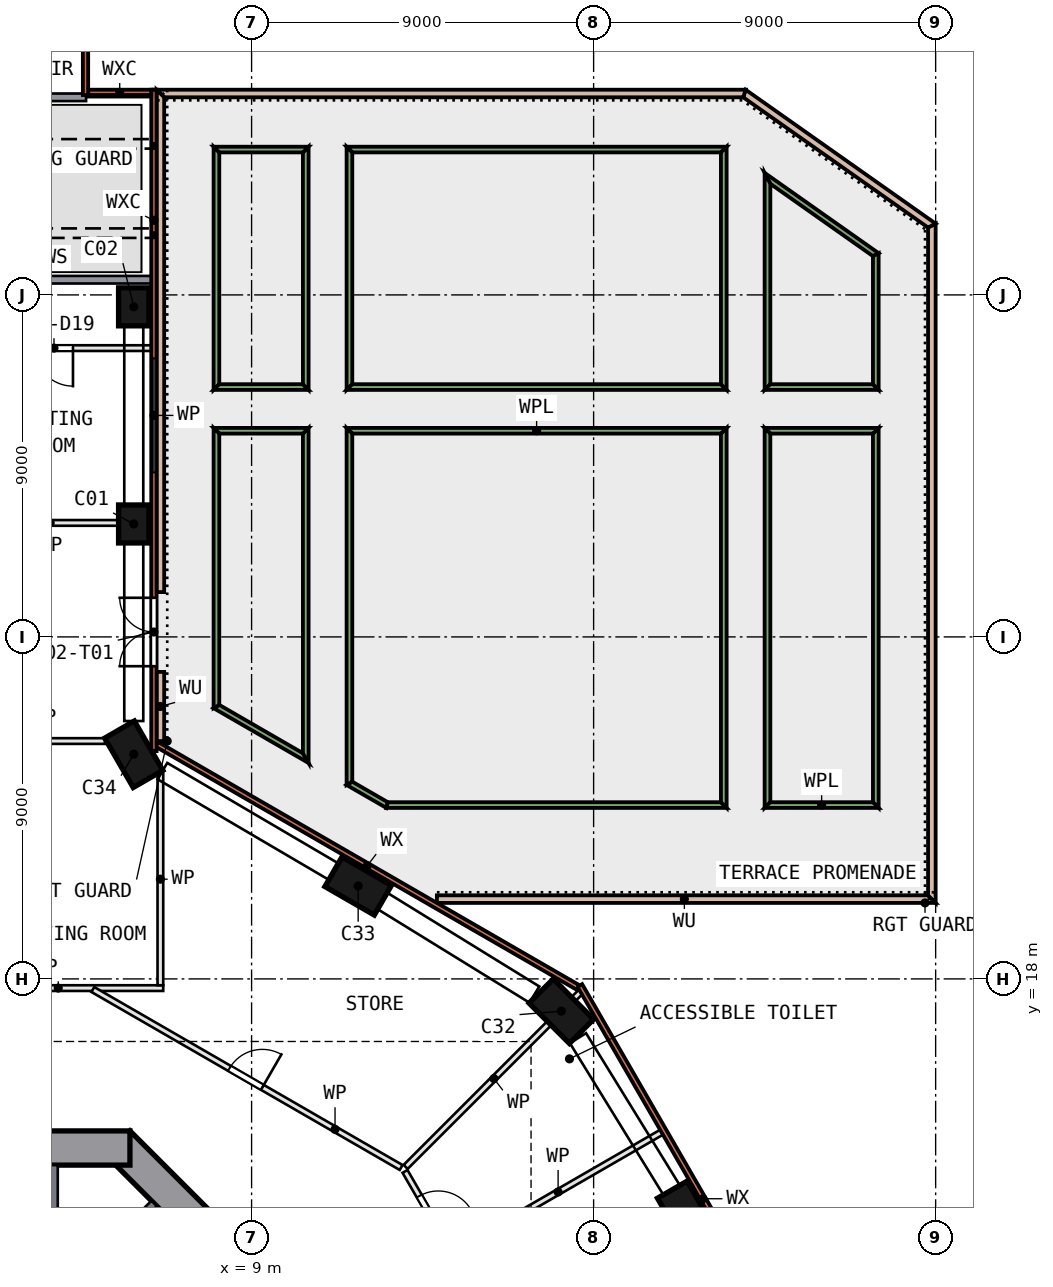
"""IFC4 building model, lengths in metres.
Left out: names, types, materials, properties, quantities, classifications, styles, units other than length and angle.
Written with IfcOpenShell. Run it as: python <this file> out.ifc"""

import sys

from ifc_helpers import new_model, si_unit, direction, frame, frame_2d, origin, origin_2d, place, context, subcontext, project, spatial, polyline, rectangle, outline, extrude, element, fill, save


model = new_model("IFC4")
c1 = context("Model", 3, precision=1e-05, world=origin(), true_north=direction((0.0, 1.0)))
c2 = subcontext(c1, "Body", "Model", "MODEL_VIEW")
j1 = project(units=[si_unit("LENGTHUNIT", "METRE"), si_unit("PLANEANGLEUNIT", "RADIAN")], contexts=[c1])
p1 = place(None, origin())
s1 = spatial("IfcSite", under=j1, at=p1, CompositionType="ELEMENT")
p2 = place(p1, origin())
s2 = spatial("IfcBuilding", under=s1, at=p2, CompositionType="ELEMENT")
p3 = place(p2, frame((0.0, 0.0, 14.0)))
s3 = spatial("IfcBuildingStorey", under=s2, at=p3, CompositionType="ELEMENT", Elevation=14.0)
for number, where, z_axis, x_axis in (
    (1, (5.9, 29.972, 0.0), (0.0, 0.0, 1.0), (0.0, 1.0, 0.0)),
    (2, (5.9, 35.686, 0.0), (0.0, 0.0, 1.0), (0.0, 1.0, 0.0)),
):
    element("IfcColumn", number, at=place(p3, frame(where, z_axis=z_axis, x_axis=x_axis)), inside=s3, PredefinedType="COLUMN", context=c2, shape_type="SweptSolid", body=[
        extrude(rectangle(XDim=1.0, YDim=0.8, at=origin_2d()), origin(), (0.0, 0.0, 1.0), 4.55),
    ])
for number, where, z_axis, x_axis in (
    (3, (20.445, 11.804, 0.0), (0.0, 0.0, 1.0), (-0.5, 0.866, 0.0)),
    (4, (17.151, 17.151, 0.0), (0.0, 0.0, 1.0), (0.707, -0.707, 0.0)),
    (5, (11.804, 20.445, 0.0), (0.0, 0.0, 1.0), (-0.866, 0.5, 0.0)),
    (6, (5.9, 23.912, 0.0), (0.0, 0.0, 1.0), (0.5, -0.866, 0.0)),
):
    element("IfcColumn", number, at=place(p3, frame(where, z_axis=z_axis, x_axis=x_axis)), inside=s3, PredefinedType="COLUMN", context=c2, shape_type="SweptSolid", body=[
        extrude(rectangle(XDim=1.5, YDim=0.9, at=origin_2d()), origin(), (0.0, 0.0, 1.0), 4.55),
    ])
p4 = place(p3, frame((13.682, 5.481, 0.0), z_axis=(0.0, 0.0, 1.0), x_axis=(-0.707106781, 0.707106781, 0.0)))
e7 = element("IfcWall", 7, at=p4, inside=s3, PredefinedType="SHEAR", context=c2, shape_type="SweptSolid", body=[
    extrude(rectangle(XDim=11.598, YDim=0.9, at=frame_2d((5.799, 0.0))), origin(), (0.0, 0.0, 1.0), 5.0),
])
p5 = place(p4, frame((2.099, 0.0, 0.0)))
e8 = element("IfcOpeningElement", 8, at=p5, cuts=e7, PredefinedType="OPENING", context=c2, shape_type="SweptSolid", body=[
    extrude(rectangle(XDim=1.2, YDim=2.1, at=frame_2d((0.6, 1.05))), frame((0.0, 0.46, 0.0), z_axis=(0.0, -1.0, 0.0), x_axis=(1.0, 0.0, 0.0)), (0.0, 0.0, 1.0), 0.92),
])
p6 = place(p3, frame((5.799, 13.55, 0.0), z_axis=(0.0, 0.0, 1.0), x_axis=(-1.0, 0.0, 0.0)))
e9 = element("IfcWall", 9, at=p6, inside=s3, PredefinedType="SHEAR", context=c2, shape_type="SweptSolid", body=[
    extrude(rectangle(XDim=11.598, YDim=0.9, at=frame_2d((5.799, 0.0))), origin(), (0.0, 0.0, 1.0), 5.0),
])
p7 = place(p6, frame((4.899, 0.0, 0.0)))
e10 = element("IfcOpeningElement", 10, at=p7, cuts=e9, PredefinedType="OPENING", context=c2, shape_type="SweptSolid", body=[
    extrude(rectangle(XDim=1.8, YDim=2.1, at=frame_2d((0.9, 1.05))), frame((0.0, 0.46, 0.0), z_axis=(0.0, -1.0, 0.0), x_axis=(1.0, 0.0, 0.0)), (0.0, 0.0, 1.0), 0.92),
])
p8 = place(p3, frame((24.118, 6.603, 0.0), z_axis=(0.0, 0.0, 1.0), x_axis=(-0.499997984, 0.866026568, 0.0)))
e11 = element("IfcWall", 11, at=p8, inside=s3, PredefinedType="SOLIDWALL", context=c2, shape_type="SweptSolid", body=[
    extrude(rectangle(XDim=12.962, YDim=0.14, at=frame_2d((6.481, 0.0))), origin(), (0.0, 0.0, 1.0), 4.55),
])
p9 = place(p3, frame((17.586, 17.777, 0.0), z_axis=(0.0, 0.0, 1.0), x_axis=(-0.866023287, 0.500003667, 0.0)))
e12 = element("IfcWall", 12, at=p9, inside=s3, PredefinedType="SOLIDWALL", context=c2, shape_type="SweptSolid", body=[
    extrude(rectangle(XDim=12.801, YDim=0.14, at=frame_2d((6.4, 0.0))), origin(), (0.0, 0.0, 1.0), 4.55),
])
p10 = place(p3, frame((6.43, 23.995, 0.0), z_axis=(0.0, 0.0, 1.0), x_axis=(0.0, 1.0, 0.0)))
e13 = element("IfcWall", 13, at=p10, inside=s3, PredefinedType="SOLIDWALL", context=c2, shape_type="SweptSolid", body=[
    extrude(rectangle(XDim=17.405, YDim=0.14, at=frame_2d((8.702, 0.0))), origin(), (0.0, 0.0, 1.0), 4.55),
])
p11 = place(p10, frame((2.234, 0.0, 0.0)))
e14 = element("IfcOpeningElement", 14, at=p11, cuts=e13, PredefinedType="OPENING", context=c2, shape_type="SweptSolid", body=[
    extrude(rectangle(XDim=1.8, YDim=2.4, at=frame_2d((0.9, 1.2))), frame((0.0, 0.08, 0.0), z_axis=(0.0, -1.0, 0.0), x_axis=(1.0, 0.0, 0.0)), (0.0, 0.0, 1.0), 0.16),
])
p12 = place(p10, frame((7.334, 0.0, 0.9)))
e15 = element("IfcOpeningElement", 15, at=p12, cuts=e13, PredefinedType="OPENING", context=c2, shape_type="SweptSolid", body=[
    extrude(rectangle(XDim=3.0, YDim=2.7, at=frame_2d((1.5, 1.35))), frame((0.0, 0.08, 0.0), z_axis=(0.0, -1.0, 0.0), x_axis=(1.0, 0.0, 0.0)), (0.0, 0.0, 1.0), 0.16),
])
p13 = place(p3, frame((6.36, 41.33, 0.0), z_axis=(0.0, 0.0, 1.0), x_axis=(-1.0, 0.0, 0.0)))
e16 = element("IfcWall", 16, at=p13, inside=s3, PredefinedType="SOLIDWALL", context=c2, shape_type="SweptSolid", body=[
    extrude(rectangle(XDim=1.66, YDim=0.14, at=frame_2d((0.83, 0.0))), origin(), (0.0, 0.0, 1.0), 4.55),
])
p14 = place(p3, frame((4.63, 41.26, 0.0), z_axis=(0.0, 0.0, 1.0), x_axis=(0.0, 1.0, 0.0)))
e17 = element("IfcWall", 17, at=p14, inside=s3, PredefinedType="SOLIDWALL", context=c2, shape_type="SweptSolid", body=[
    extrude(rectangle(XDim=1.94, YDim=0.14, at=frame_2d((0.97, 0.0))), origin(), (0.0, 0.0, 1.0), 4.55),
])
p15 = place(p3, origin())
e18 = element("IfcWall", 18, at=p15, inside=s3, PredefinedType="SOLIDWALL", context=c2, shape_type="SweptSolid", body=[
    extrude(outline(polyline([(13.875, 20.2), (13.875, 20.0), (27.0, 20.0), (26.8, 20.2), (13.875, 20.2)])), origin(), (0.0, 0.0, 1.0), 0.45),
])
p16 = place(p3, origin())
e19 = element("IfcWall", 19, at=p16, inside=s3, PredefinedType="SOLIDWALL", context=c2, shape_type="SweptSolid", body=[
    extrude(outline(polyline([(26.8, 20.2), (27.0, 20.0), (27.0, 37.876), (26.8, 37.772), (26.8, 20.2)])), origin(), (0.0, 0.0, 1.0), 0.45),
])
p17 = place(p3, origin())
e20 = element("IfcWall", 20, at=p17, inside=s3, PredefinedType="SOLIDWALL", context=c2, shape_type="SweptSolid", body=[
    extrude(outline(polyline([(26.8, 37.772), (27.0, 37.876), (22.0, 41.4), (21.937, 41.2), (26.8, 37.772)])), origin(), (0.0, 0.0, 1.0), 0.45),
])
p18 = place(p3, origin())
e21 = element("IfcWall", 21, at=p18, inside=s3, PredefinedType="SOLIDWALL", context=c2, shape_type="SweptSolid", body=[
    extrude(outline(polyline([(21.937, 41.2), (22.0, 41.4), (6.5, 41.4), (6.7, 41.2), (21.937, 41.2)])), origin(), (0.0, 0.0, 1.0), 0.45),
])
p19 = place(p3, origin())
e22 = element("IfcWall", 22, at=p19, inside=s3, PredefinedType="SOLIDWALL", context=c2, shape_type="SweptSolid", body=[
    extrude(outline(polyline([(6.5, 41.4), (6.5, 28.179), (6.7, 28.179), (6.7, 41.2), (6.5, 41.4)])), origin(), (0.0, 0.0, 1.0), 0.45),
])
p20 = place(p3, origin())
e23 = element("IfcWall", 23, at=p20, inside=s3, PredefinedType="SOLIDWALL", context=c2, shape_type="SweptSolid", body=[
    extrude(outline(polyline([(6.7, 24.258), (6.7, 26.079), (6.5, 26.079), (6.5, 24.258), (6.7, 24.258)])), origin(), (0.0, 0.0, 1.0), 0.45),
])
p21 = place(p3, origin())
e24 = element("IfcWall", 24, at=p21, inside=s3, PredefinedType="SOLIDWALL", context=c2, shape_type="SweptSolid", body=[
    extrude(outline(polyline([(11.5, 23.104), (12.545, 22.5), (12.586, 22.65), (11.65, 23.19), (11.5, 23.104)])), origin(), (0.0, 0.0, 1.0), 0.6),
])
p22 = place(p3, origin())
e25 = element("IfcWall", 25, at=p22, inside=s3, PredefinedType="SOLIDWALL", context=c2, shape_type="SweptSolid", body=[
    extrude(outline(polyline([(12.545, 22.5), (21.5, 22.5), (21.35, 22.65), (12.586, 22.65), (12.545, 22.5)])), origin(), (0.0, 0.0, 1.0), 0.6),
])
p23 = place(p3, origin())
e26 = element("IfcWall", 26, at=p23, inside=s3, PredefinedType="SOLIDWALL", context=c2, shape_type="SweptSolid", body=[
    extrude(outline(polyline([(21.5, 22.5), (21.5, 32.5), (21.35, 32.35), (21.35, 22.65), (21.5, 22.5)])), origin(), (0.0, 0.0, 1.0), 0.6),
])
p24 = place(p3, origin())
e27 = element("IfcWall", 27, at=p24, inside=s3, PredefinedType="SOLIDWALL", context=c2, shape_type="SweptSolid", body=[
    extrude(outline(polyline([(21.5, 32.5), (11.5, 32.5), (11.65, 32.35), (21.35, 32.35), (21.5, 32.5)])), origin(), (0.0, 0.0, 1.0), 0.6),
])
p25 = place(p3, origin())
e28 = element("IfcWall", 28, at=p25, inside=s3, PredefinedType="SOLIDWALL", context=c2, shape_type="SweptSolid", body=[
    extrude(outline(polyline([(11.5, 32.5), (11.5, 23.104), (11.65, 23.19), (11.65, 32.35), (11.5, 32.5)])), origin(), (0.0, 0.0, 1.0), 0.6),
])
p26 = place(p3, origin())
e29 = element("IfcWall", 29, at=p26, inside=s3, PredefinedType="SOLIDWALL", context=c2, shape_type="SweptSolid", body=[
    extrude(outline(polyline([(8.0, 25.125), (10.5, 23.681), (10.35, 23.941), (8.15, 25.211), (8.0, 25.125)])), origin(), (0.0, 0.0, 1.0), 0.6),
])
p27 = place(p3, origin())
e30 = element("IfcWall", 30, at=p27, inside=s3, PredefinedType="SOLIDWALL", context=c2, shape_type="SweptSolid", body=[
    extrude(outline(polyline([(10.5, 23.681), (10.5, 32.5), (10.35, 32.35), (10.35, 23.941), (10.5, 23.681)])), origin(), (0.0, 0.0, 1.0), 0.6),
])
p28 = place(p3, origin())
e31 = element("IfcWall", 31, at=p28, inside=s3, PredefinedType="SOLIDWALL", context=c2, shape_type="SweptSolid", body=[
    extrude(outline(polyline([(10.5, 32.5), (8.0, 32.5), (8.15, 32.35), (10.35, 32.35), (10.5, 32.5)])), origin(), (0.0, 0.0, 1.0), 0.6),
])
p29 = place(p3, origin())
e32 = element("IfcWall", 32, at=p29, inside=s3, PredefinedType="SOLIDWALL", context=c2, shape_type="SweptSolid", body=[
    extrude(outline(polyline([(8.0, 32.5), (8.0, 25.125), (8.15, 25.211), (8.15, 32.35), (8.0, 32.5)])), origin(), (0.0, 0.0, 1.0), 0.6),
])
p30 = place(p3, origin())
e33 = element("IfcWall", 33, at=p30, inside=s3, PredefinedType="SOLIDWALL", context=c2, shape_type="SweptSolid", body=[
    extrude(outline(polyline([(8.0, 39.9), (8.0, 33.5), (8.15, 33.65), (8.15, 39.75), (8.0, 39.9)])), origin(), (0.0, 0.0, 1.0), 0.6),
])
p31 = place(p3, origin())
e34 = element("IfcWall", 34, at=p31, inside=s3, PredefinedType="SOLIDWALL", context=c2, shape_type="SweptSolid", body=[
    extrude(outline(polyline([(8.0, 33.5), (10.5, 33.5), (10.35, 33.65), (8.15, 33.65), (8.0, 33.5)])), origin(), (0.0, 0.0, 1.0), 0.6),
])
p32 = place(p3, origin())
e35 = element("IfcWall", 35, at=p32, inside=s3, PredefinedType="SOLIDWALL", context=c2, shape_type="SweptSolid", body=[
    extrude(outline(polyline([(10.5, 33.5), (10.5, 39.9), (10.35, 39.75), (10.35, 33.65), (10.5, 33.5)])), origin(), (0.0, 0.0, 1.0), 0.6),
])
p33 = place(p3, origin())
e36 = element("IfcWall", 36, at=p33, inside=s3, PredefinedType="SOLIDWALL", context=c2, shape_type="SweptSolid", body=[
    extrude(outline(polyline([(10.5, 39.9), (8.0, 39.9), (8.15, 39.75), (10.35, 39.75), (10.5, 39.9)])), origin(), (0.0, 0.0, 1.0), 0.6),
])
p34 = place(p3, origin())
e37 = element("IfcWall", 37, at=p34, inside=s3, PredefinedType="SOLIDWALL", context=c2, shape_type="SweptSolid", body=[
    extrude(outline(polyline([(21.5, 39.9), (11.5, 39.9), (11.65, 39.75), (21.35, 39.75), (21.5, 39.9)])), origin(), (0.0, 0.0, 1.0), 0.6),
])
p35 = place(p3, origin())
e38 = element("IfcWall", 38, at=p35, inside=s3, PredefinedType="SOLIDWALL", context=c2, shape_type="SweptSolid", body=[
    extrude(outline(polyline([(11.5, 39.9), (11.5, 33.5), (11.65, 33.65), (11.65, 39.75), (11.5, 39.9)])), origin(), (0.0, 0.0, 1.0), 0.6),
])
p36 = place(p3, origin())
e39 = element("IfcWall", 39, at=p36, inside=s3, PredefinedType="SOLIDWALL", context=c2, shape_type="SweptSolid", body=[
    extrude(outline(polyline([(11.5, 33.5), (21.5, 33.5), (21.35, 33.65), (11.65, 33.65), (11.5, 33.5)])), origin(), (0.0, 0.0, 1.0), 0.6),
])
p37 = place(p3, origin())
e40 = element("IfcWall", 40, at=p37, inside=s3, PredefinedType="SOLIDWALL", context=c2, shape_type="SweptSolid", body=[
    extrude(outline(polyline([(21.5, 33.5), (21.5, 39.9), (21.35, 39.75), (21.35, 33.65), (21.5, 33.5)])), origin(), (0.0, 0.0, 1.0), 0.6),
])
p38 = place(p3, origin())
e41 = element("IfcWall", 41, at=p38, inside=s3, PredefinedType="SOLIDWALL", context=c2, shape_type="SweptSolid", body=[
    extrude(outline(polyline([(25.5, 37.098), (22.5, 39.212), (22.65, 38.923), (25.35, 37.021), (25.5, 37.098)])), origin(), (0.0, 0.0, 1.0), 0.6),
])
p39 = place(p3, origin())
e42 = element("IfcWall", 42, at=p39, inside=s3, PredefinedType="SOLIDWALL", context=c2, shape_type="SweptSolid", body=[
    extrude(outline(polyline([(22.5, 39.212), (22.5, 33.5), (22.65, 33.65), (22.65, 38.923), (22.5, 39.212)])), origin(), (0.0, 0.0, 1.0), 0.6),
])
p40 = place(p3, origin())
e43 = element("IfcWall", 43, at=p40, inside=s3, PredefinedType="SOLIDWALL", context=c2, shape_type="SweptSolid", body=[
    extrude(outline(polyline([(22.5, 33.5), (25.5, 33.5), (25.35, 33.65), (22.65, 33.65), (22.5, 33.5)])), origin(), (0.0, 0.0, 1.0), 0.6),
])
p41 = place(p3, origin())
e44 = element("IfcWall", 44, at=p41, inside=s3, PredefinedType="SOLIDWALL", context=c2, shape_type="SweptSolid", body=[
    extrude(outline(polyline([(25.5, 33.5), (25.5, 37.098), (25.35, 37.021), (25.35, 33.65), (25.5, 33.5)])), origin(), (0.0, 0.0, 1.0), 0.6),
])
p42 = place(p3, origin())
e45 = element("IfcWall", 45, at=p42, inside=s3, PredefinedType="SOLIDWALL", context=c2, shape_type="SweptSolid", body=[
    extrude(outline(polyline([(25.5, 22.5), (25.5, 32.5), (25.35, 32.35), (25.35, 22.65), (25.5, 22.5)])), origin(), (0.0, 0.0, 1.0), 0.6),
])
p43 = place(p3, origin())
e46 = element("IfcWall", 46, at=p43, inside=s3, PredefinedType="SOLIDWALL", context=c2, shape_type="SweptSolid", body=[
    extrude(outline(polyline([(25.5, 32.5), (22.5, 32.5), (22.65, 32.35), (25.35, 32.35), (25.5, 32.5)])), origin(), (0.0, 0.0, 1.0), 0.6),
])
p44 = place(p3, origin())
e47 = element("IfcWall", 47, at=p44, inside=s3, PredefinedType="SOLIDWALL", context=c2, shape_type="SweptSolid", body=[
    extrude(outline(polyline([(22.5, 32.5), (22.5, 22.5), (22.65, 22.65), (22.65, 32.35), (22.5, 32.5)])), origin(), (0.0, 0.0, 1.0), 0.6),
])
p45 = place(p3, origin())
e48 = element("IfcWall", 48, at=p45, inside=s3, PredefinedType="SOLIDWALL", context=c2, shape_type="SweptSolid", body=[
    extrude(outline(polyline([(22.5, 22.5), (25.5, 22.5), (25.35, 22.65), (22.65, 22.65), (22.5, 22.5)])), origin(), (0.0, 0.0, 1.0), 0.6),
])
p46 = place(p3, origin())
e49 = element("IfcWall", 49, at=p46, inside=s3, PredefinedType="SOLIDWALL", context=c2, shape_type="SweptSolid", body=[
    extrude(outline(polyline([(3.9, 13.1), (3.9, 10.9), (3.7, 10.9), (3.7, 12.9), (1.4, 12.9), (1.4, 10.9), (1.2, 10.9), (1.2, 13.1), (3.9, 13.1)])), origin(), (0.0, 0.0, 1.0), 4.55),
])
p47 = place(p3, frame((3.677, 9.334, 0.0), z_axis=(0.0, 0.0, 1.0), x_axis=(0.707106781, 0.707106781, 0.0)))
e50 = element("IfcWall", 50, at=p47, inside=s3, PredefinedType="SOLIDWALL", context=c2, shape_type="SweptSolid", body=[
    extrude(rectangle(XDim=3.9, YDim=0.2, at=frame_2d((1.95, 0.0))), origin(), (0.0, 0.0, 1.0), 4.55),
])
p48 = place(p3, frame((-2.9, 36.4, 0.0), z_axis=(0.0, 0.0, 1.0), x_axis=(1.0, 0.0, 0.0)))
e51 = element("IfcWall", 51, at=p48, inside=s3, PredefinedType="SOLIDWALL", context=c2, shape_type="SweptSolid", body=[
    extrude(rectangle(XDim=9.26, YDim=0.2, at=frame_2d((4.63, 0.0))), origin(), (0.0, 0.0, 1.0), 4.55),
])
p49 = place(p3, frame((1.15, 17.758, 0.0), z_axis=(0.0, 0.0, 1.0), x_axis=(1.0, 0.0, 0.0)))
e52 = element("IfcWall", 52, at=p49, inside=s3, PredefinedType="PARTITIONING", context=c2, shape_type="SweptSolid", body=[
    extrude(rectangle(XDim=5.525, YDim=0.15, at=frame_2d((2.763, 0.0))), origin(), (0.0, 0.0, 1.0), 4.55),
])
p50 = place(p3, frame((6.36, 34.6, 0.0), z_axis=(0.0, 0.0, 1.0), x_axis=(-1.0, 0.0, 0.0)))
e53 = element("IfcWall", 53, at=p50, inside=s3, PredefinedType="PARTITIONING", context=c2, shape_type="SweptSolid", body=[
    extrude(rectangle(XDim=5.21, YDim=0.15, at=frame_2d((2.605, 0.0))), origin(), (0.0, 0.0, 1.0), 4.55),
])
p51 = place(p50, frame((2.06, 0.0, 0.0)))
e54 = element("IfcOpeningElement", 54, at=p51, cuts=e53, PredefinedType="OPENING", context=c2, shape_type="SweptSolid", body=[
    extrude(rectangle(XDim=1.0, YDim=2.1, at=frame_2d((0.5, 1.05))), frame((0.0, 0.085, 0.0), z_axis=(0.0, -1.0, 0.0), x_axis=(1.0, 0.0, 0.0)), (0.0, 0.0, 1.0), 0.17),
])
p52 = place(p3, frame((4.823, 17.721, 0.0), z_axis=(0.0, 0.0, 1.0), x_axis=(0.866037142, -0.499979668, 0.0)))
e55 = element("IfcWall", 55, at=p52, inside=s3, PredefinedType="PARTITIONING", context=c2, shape_type="SweptSolid", body=[
    extrude(rectangle(XDim=9.367, YDim=0.15, at=frame_2d((4.683, 0.0))), origin(), (0.0, 0.0, 1.0), 4.55),
])
p53 = place(p52, frame((4.15, 0.0, 0.0)))
e56 = element("IfcOpeningElement", 56, at=p53, cuts=e55, PredefinedType="OPENING", context=c2, shape_type="SweptSolid", body=[
    extrude(rectangle(XDim=1.0, YDim=2.1, at=frame_2d((0.5, 1.05))), frame((0.0, 0.085, 0.0), z_axis=(0.0, -1.0, 0.0), x_axis=(1.0, 0.0, 0.0)), (0.0, 0.0, 1.0), 0.17),
])
p54 = place(p3, frame((5.145, 24.26, 0.0), z_axis=(0.0, 0.0, 1.0), x_axis=(-1.0, 0.0, 0.0)))
e57 = element("IfcWall", 57, at=p54, inside=s3, PredefinedType="PARTITIONING", context=c2, shape_type="SweptSolid", body=[
    extrude(rectangle(XDim=3.215, YDim=0.15, at=frame_2d((1.607, 0.0))), origin(), (0.0, 0.0, 1.0), 4.55),
])
p55 = place(p3, frame((5.47, 30.0, 0.0), z_axis=(0.0, 0.0, 1.0), x_axis=(-1.0, 0.0, 0.0)))
e58 = element("IfcWall", 58, at=p55, inside=s3, PredefinedType="PARTITIONING", context=c2, shape_type="SweptSolid", body=[
    extrude(rectangle(XDim=3.54, YDim=0.15, at=frame_2d((1.77, 0.0))), origin(), (0.0, 0.0, 1.0), 4.55),
])
p56 = place(p3, frame((4.645, 41.2, 0.0), z_axis=(0.0, 0.0, 1.0), x_axis=(-1.0, 0.0, 0.0)))
e59 = element("IfcWall", 59, at=p56, inside=s3, PredefinedType="SOLIDWALL", context=c2, shape_type="SweptSolid", body=[
    extrude(rectangle(XDim=7.545, YDim=0.2, at=frame_2d((3.772, 0.0))), origin(), (0.0, 0.0, 1.0), 4.55),
])
p57 = place(p3, frame((6.6, 17.833, 0.0), z_axis=(0.0, 0.0, 1.0), x_axis=(0.0, 1.0, 0.0)))
e60 = element("IfcWall", 60, at=p57, inside=s3, PredefinedType="PARTITIONING", context=c2, shape_type="SweptSolid", body=[
    extrude(rectangle(XDim=5.582, YDim=0.15, at=frame_2d((2.791, 0.0))), origin(), (0.0, 0.0, 1.0), 4.55),
])
p58 = place(p3, frame((13.038, 12.935, 0.0), z_axis=(0.0, 0.0, 1.0), x_axis=(0.499933044, -0.866064057, 0.0)))
e61 = element("IfcWall", 61, at=p58, inside=s3, PredefinedType="PARTITIONING", context=c2, shape_type="SweptSolid", body=[
    extrude(rectangle(XDim=2.408, YDim=0.15, at=frame_2d((1.204, 0.0))), origin(), (0.0, 0.0, 1.0), 4.55),
])
p59 = place(p58, frame((0.75, 0.0, 0.0)))
e62 = element("IfcOpeningElement", 62, at=p59, cuts=e61, PredefinedType="OPENING", context=c2, shape_type="SweptSolid", body=[
    extrude(rectangle(XDim=1.0, YDim=2.1, at=frame_2d((0.5, 1.05))), frame((0.0, 0.085, 0.0), z_axis=(0.0, -1.0, 0.0), x_axis=(1.0, 0.0, 0.0)), (0.0, 0.0, 1.0), 0.17),
])
p60 = place(p3, frame((17.7, 17.7, 0.0), z_axis=(0.0, 0.0, 1.0), x_axis=(-0.707106781, -0.707106781, 0.0)))
e63 = element("IfcWall", 63, at=p60, inside=s3, PredefinedType="PARTITIONING", context=c2, shape_type="SweptSolid", body=[
    extrude(rectangle(XDim=6.572, YDim=0.15, at=frame_2d((3.286, 0.0))), origin(), (0.0, 0.0, 1.0), 4.55),
])
p61 = place(p3, frame((19.787, 13.964, 0.0), z_axis=(0.0, 0.0, 1.0), x_axis=(-0.866042631, -0.49997016, 0.0)))
e64 = element("IfcWall", 64, at=p61, inside=s3, PredefinedType="PARTITIONING", context=c2, shape_type="SweptSolid", body=[
    extrude(rectangle(XDim=6.285, YDim=0.15, at=frame_2d((3.143, 0.0))), origin(), (0.0, 0.0, 1.0), 4.55),
])
p62 = place(p11, origin())
e65 = element("IfcDoor", 65, at=p62, inside=s3, OperationType="DOUBLE_DOOR_SINGLE_SWING", PredefinedType="DOOR", context=c2, shape_type="SweptSolid", body=[
    extrude(rectangle(XDim=1.8, YDim=2.4, at=frame_2d((0.9, 1.2))), frame((0.0, 0.025, 0.0), z_axis=(0.0, -1.0, 0.0), x_axis=(1.0, 0.0, 0.0)), (0.0, 0.0, 1.0), 0.05),
])
fill(e14, e65)
p63 = place(p12, origin())
e66 = element("IfcWindow", 66, at=p63, inside=s3, PartitioningType="SINGLE_PANEL", PredefinedType="WINDOW", context=c2, shape_type="SweptSolid", body=[
    extrude(rectangle(XDim=3.0, YDim=2.7, at=frame_2d((1.5, 1.35))), frame((0.0, 0.03, 0.0), z_axis=(0.0, -1.0, 0.0), x_axis=(1.0, 0.0, 0.0)), (0.0, 0.0, 1.0), 0.06),
])
fill(e15, e66)
p64 = place(p51, origin())
e67 = element("IfcDoor", 67, at=p64, inside=s3, OperationType="SINGLE_SWING_LEFT", PredefinedType="DOOR", context=c2, shape_type="SweptSolid", body=[
    extrude(rectangle(XDim=1.0, YDim=2.1, at=frame_2d((0.5, 1.05))), frame((0.0, 0.025, 0.0), z_axis=(0.0, -1.0, 0.0), x_axis=(1.0, 0.0, 0.0)), (0.0, 0.0, 1.0), 0.05),
])
fill(e54, e67)
p65 = place(p53, origin())
e68 = element("IfcDoor", 68, at=p65, inside=s3, OperationType="SINGLE_SWING_RIGHT", PredefinedType="DOOR", context=c2, shape_type="SweptSolid", body=[
    extrude(rectangle(XDim=1.0, YDim=2.1, at=frame_2d((0.5, 1.05))), frame((0.0, 0.025, 0.0), z_axis=(0.0, -1.0, 0.0), x_axis=(1.0, 0.0, 0.0)), (0.0, 0.0, 1.0), 0.05),
])
fill(e56, e68)
p66 = place(p59, origin())
e69 = element("IfcDoor", 69, at=p66, inside=s3, OperationType="SINGLE_SWING_RIGHT", PredefinedType="DOOR", context=c2, shape_type="SweptSolid", body=[
    extrude(rectangle(XDim=1.0, YDim=2.1, at=frame_2d((0.5, 1.05))), frame((0.0, 0.025, 0.0), z_axis=(0.0, -1.0, 0.0), x_axis=(1.0, 0.0, 0.0)), (0.0, 0.0, 1.0), 0.05),
])
fill(e62, e69)
save(model, sys.argv[1])
